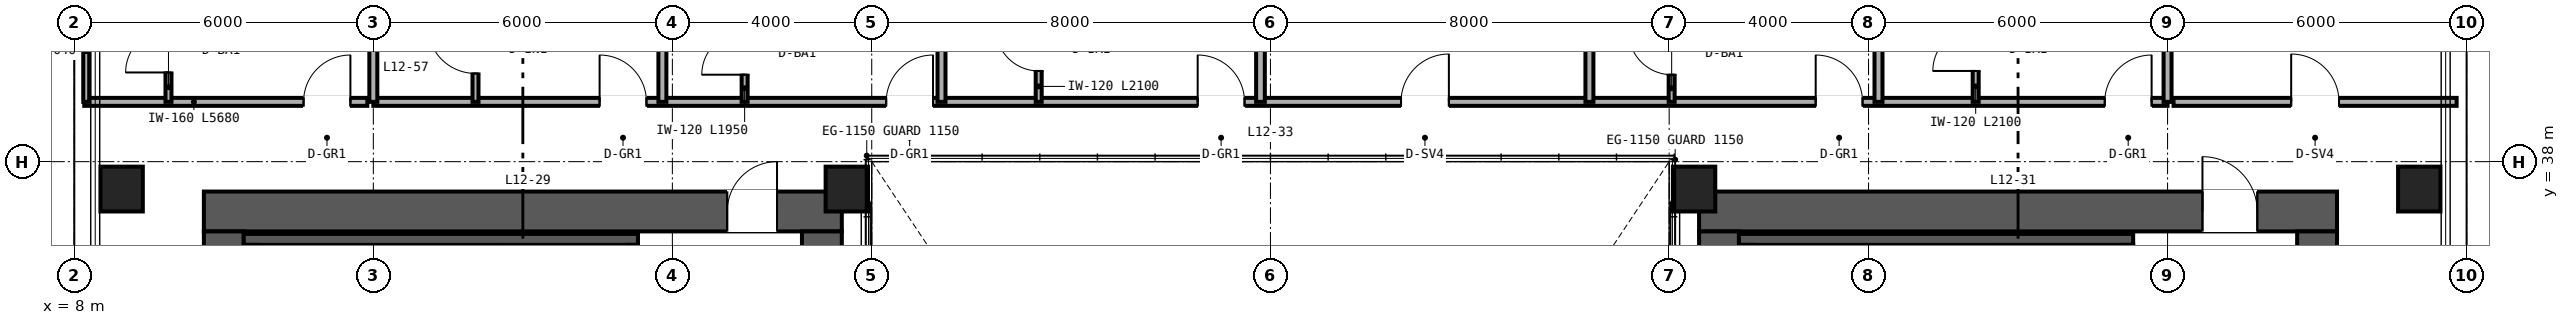
"""IFC4 building model, lengths in metres.
Left out: names, types, materials, properties, quantities, classifications, styles, units other than length and angle.
Written with IfcOpenShell. Run it as: python <this file> out.ifc"""

import sys

from ifc_helpers import new_model, si_unit, direction, frame, frame_2d, origin, origin_2d, place, context, subcontext, project, spatial, rectangle, hollow_rectangle, extrude, source, transform, mapped, element, fill, save


model = new_model("IFC4")
c1 = context("Model", 3, precision=1e-05, world=origin(), true_north=direction((0.0, 1.0)))
c2 = subcontext(c1, "Body", "Model", "MODEL_VIEW")
j1 = project(units=[si_unit("LENGTHUNIT", "METRE"), si_unit("PLANEANGLEUNIT", "RADIAN")], contexts=[c1])
p1 = place(None, origin())
s1 = spatial("IfcSite", under=j1, at=p1, CompositionType="ELEMENT")
p2 = place(p1, origin())
s2 = spatial("IfcBuilding", under=s1, at=p2, CompositionType="ELEMENT")
p3 = place(p2, frame((0.0, 0.0, 52.8)))
s3 = spatial("IfcBuildingStorey", under=s2, at=p3, CompositionType="ELEMENT", Elevation=52.8)
p4 = place(p3, frame((10.6, 37.0, 0.0), z_axis=(0.0, 0.0, 1.0), x_axis=(1.0, 0.0, 0.0)))
e1 = element("IfcWall", 1, at=p4, inside=s3, PredefinedType="SHEAR", context=c2, shape_type="SweptSolid", body=[
    extrude(rectangle(XDim=12.8, YDim=0.8, at=frame_2d((6.4, 0.0))), origin(), (0.0, 0.0, 1.0), 3.35),
])
p5 = place(p4, frame((10.5, 0.0, 0.0)))
e2 = element("IfcOpeningElement", 2, at=p5, cuts=e1, PredefinedType="OPENING", context=c2, shape_type="SweptSolid", body=[
    extrude(rectangle(XDim=1.0, YDim=2.15, at=frame_2d((0.5, 1.075))), frame((0.0, 0.41, 0.0), z_axis=(0.0, -1.0, 0.0), x_axis=(1.0, 0.0, 0.0)), (0.0, 0.0, 1.0), 0.82),
])
for number, where, z_axis, x_axis in (
    (3, (11.0, 15.4, 0.0), (0.0, 0.0, 1.0), (0.0, 1.0, 0.0)),
    (4, (23.0, 15.4, 0.0), (0.0, 0.0, 1.0), (0.0, 1.0, 0.0)),
):
    element("IfcWall", number, at=place(p3, frame(where, z_axis=z_axis, x_axis=x_axis)), inside=s3, PredefinedType="SHEAR", context=c2, shape_type="SweptSolid", body=[
        extrude(rectangle(XDim=21.2, YDim=0.8, at=frame_2d((10.6, 0.0))), origin(), (0.0, 0.0, 1.0), 3.35),
    ])
p6 = place(p3, frame((40.6, 37.0, 0.0), z_axis=(0.0, 0.0, 1.0), x_axis=(1.0, 0.0, 0.0)))
e5 = element("IfcWall", 5, at=p6, inside=s3, PredefinedType="SHEAR", context=c2, shape_type="SweptSolid", body=[
    extrude(rectangle(XDim=12.8, YDim=0.8, at=frame_2d((6.4, 0.0))), origin(), (0.0, 0.0, 1.0), 3.35),
])
p7 = place(p6, frame((10.1, 0.0, 0.0)))
e6 = element("IfcOpeningElement", 6, at=p7, cuts=e5, PredefinedType="OPENING", context=c2, shape_type="SweptSolid", body=[
    extrude(rectangle(XDim=1.1, YDim=2.15, at=frame_2d((0.55, 1.075))), frame((0.0, 0.41, 0.0), z_axis=(0.0, -1.0, 0.0), x_axis=(1.0, 0.0, 0.0)), (0.0, 0.0, 1.0), 0.82),
])
for number, where, z_axis, x_axis in (
    (7, (41.0, 15.4, 0.0), (0.0, 0.0, 1.0), (0.0, 1.0, 0.0)),
    (8, (53.0, 15.4, 0.0), (0.0, 0.0, 1.0), (0.0, 1.0, 0.0)),
):
    element("IfcWall", number, at=place(p3, frame(where, z_axis=z_axis, x_axis=x_axis)), inside=s3, PredefinedType="SHEAR", context=c2, shape_type="SweptSolid", body=[
        extrude(rectangle(XDim=21.2, YDim=0.8, at=frame_2d((10.6, 0.0))), origin(), (0.0, 0.0, 1.0), 3.35),
    ])
p8 = place(p3, frame((11.4, 36.44, 0.0), z_axis=(0.0, 0.0, 1.0), x_axis=(1.0, 0.0, 0.0)))
e9 = element("IfcWall", 9, at=p8, inside=s3, PredefinedType="SHEAR", context=c2, shape_type="SweptSolid", body=[
    extrude(rectangle(XDim=7.91, YDim=0.22, at=frame_2d((3.955, 0.0))), origin(), (0.0, 0.0, 1.0), 3.4),
])
for number, where, z_axis, x_axis in (
    (10, (11.56, 33.05, 0.0), (0.0, 0.0, 1.0), (0.0, 1.0, 0.0)),
    (11, (19.2, 33.05, 0.0), (0.0, 0.0, 1.0), (0.0, 1.0, 0.0)),
):
    element("IfcWall", number, at=place(p3, frame(where, z_axis=z_axis, x_axis=x_axis)), inside=s3, PredefinedType="SHEAR", context=c2, shape_type="SweptSolid", body=[
        extrude(rectangle(XDim=3.28, YDim=0.22, at=frame_2d((1.64, 0.0))), origin(), (0.0, 0.0, 1.0), 3.4),
    ])
p9 = place(p3, frame((41.4, 36.44, 0.0), z_axis=(0.0, 0.0, 1.0), x_axis=(1.0, 0.0, 0.0)))
e12 = element("IfcWall", 12, at=p9, inside=s3, PredefinedType="SHEAR", context=c2, shape_type="SweptSolid", body=[
    extrude(rectangle(XDim=7.91, YDim=0.22, at=frame_2d((3.955, 0.0))), origin(), (0.0, 0.0, 1.0), 3.4),
])
for number, where, z_axis, x_axis in (
    (13, (41.56, 33.05, 0.0), (0.0, 0.0, 1.0), (0.0, 1.0, 0.0)),
    (14, (49.2, 33.05, 0.0), (0.0, 0.0, 1.0), (0.0, 1.0, 0.0)),
):
    element("IfcWall", number, at=place(p3, frame(where, z_axis=z_axis, x_axis=x_axis)), inside=s3, PredefinedType="SHEAR", context=c2, shape_type="SweptSolid", body=[
        extrude(rectangle(XDim=3.28, YDim=0.22, at=frame_2d((1.64, 0.0))), origin(), (0.0, 0.0, 1.0), 3.4),
    ])
m1 = source(origin(), c2, "Body", "SweptSolid", [
    extrude(hollow_rectangle(XDim=0.85, YDim=0.9, WallThickness=0.04, at=origin_2d()), origin(), (0.0, 0.0, 1.0), 3.35),
])
for number, where, z_axis, x_axis in (
    (15, (8.95, 37.45, 0.0), (0.0, 0.0, 1.0), (1.0, 0.0, 0.0)),
    (16, (23.5, 37.45, 0.0), (0.0, 0.0, 1.0), (1.0, 0.0, 0.0)),
    (17, (40.5, 37.45, 0.0), (0.0, 0.0, 1.0), (1.0, 0.0, 0.0)),
    (18, (55.05, 37.45, 0.0), (0.0, 0.0, 1.0), (1.0, 0.0, 0.0)),
):
    element("IfcColumn", number, at=place(p3, frame(where, z_axis=z_axis, x_axis=x_axis)), inside=s3, PredefinedType="COLUMN", context=c2, shape_type="MappedRepresentation", body=[
        mapped(m1, transform((0.0, 0.0, 0.0), scale=1.0)),
    ])
p10 = place(p3, frame((8.2, 39.2, 0.0), z_axis=(0.0, 0.0, 1.0), x_axis=(1.0, 0.0, 0.0)))
e19 = element("IfcWall", 19, at=p10, inside=s3, PredefinedType="PARTITIONING", context=c2, shape_type="SweptSolid", body=[
    extrude(rectangle(XDim=5.68, YDim=0.16, at=frame_2d((2.84, 0.0))), origin(), (0.0, 0.0, 1.0), 3.35),
])
p11 = place(p10, frame((4.4, 0.0, 0.0)))
e20 = element("IfcOpeningElement", 20, at=p11, cuts=e19, PredefinedType="OPENING", context=c2, shape_type="SweptSolid", body=[
    extrude(rectangle(XDim=0.94, YDim=2.15, at=frame_2d((0.47, 1.075))), frame((0.0, 0.09, 0.0), z_axis=(0.0, -1.0, 0.0), x_axis=(1.0, 0.0, 0.0)), (0.0, 0.0, 1.0), 0.18),
])
p12 = place(p3, frame((9.89, 39.2, 0.0), z_axis=(0.0, 0.0, 1.0), x_axis=(0.0, 1.0, 0.0)))
e21 = element("IfcWall", 21, at=p12, inside=s3, PredefinedType="PARTITIONING", context=c2, shape_type="SweptSolid", body=[
    extrude(rectangle(XDim=2.04, YDim=0.12, at=frame_2d((1.02, 0.0))), origin(), (0.0, 0.0, 1.0), 3.35),
])
p13 = place(p12, frame((0.59, 0.0, 0.0)))
e22 = element("IfcOpeningElement", 22, at=p13, cuts=e21, PredefinedType="OPENING", context=c2, shape_type="SweptSolid", body=[
    extrude(rectangle(XDim=0.86, YDim=2.1, at=frame_2d((0.43, 1.05))), frame((0.0, 0.07, 0.0), z_axis=(0.0, -1.0, 0.0), x_axis=(1.0, 0.0, 0.0)), (0.0, 0.0, 1.0), 0.14),
])
p14 = place(p3, frame((8.24, 39.2, 0.0), z_axis=(0.0, 0.0, 1.0), x_axis=(0.0, 1.0, 0.0)))
e23 = element("IfcWall", 23, at=p14, inside=s3, PredefinedType="PARTITIONING", context=c2, shape_type="SweptSolid", body=[
    extrude(rectangle(XDim=2.04, YDim=0.12, at=frame_2d((1.02, 0.0))), origin(), (0.0, 0.0, 1.0), 3.35),
])
p15 = place(p3, frame((50.12, 39.2, 0.0), z_axis=(0.0, 0.0, 1.0), x_axis=(1.0, 0.0, 0.0)))
e24 = element("IfcWall", 24, at=p15, inside=s3, PredefinedType="PARTITIONING", context=c2, shape_type="SweptSolid", body=[
    extrude(rectangle(XDim=5.68, YDim=0.16, at=frame_2d((2.84, 0.0))), origin(), (0.0, 0.0, 1.0), 3.35),
])
p16 = place(p15, frame((2.36, 0.0, 0.0)))
e25 = element("IfcOpeningElement", 25, at=p16, cuts=e24, PredefinedType="OPENING", context=c2, shape_type="SweptSolid", body=[
    extrude(rectangle(XDim=0.96, YDim=2.15, at=frame_2d((0.48, 1.075))), frame((0.0, 0.09, 0.0), z_axis=(0.0, -1.0, 0.0), x_axis=(1.0, 0.0, 0.0)), (0.0, 0.0, 1.0), 0.18),
])
p17 = place(p3, frame((14.0, 39.2, 0.0), z_axis=(0.0, 0.0, 1.0), x_axis=(1.0, 0.0, 0.0)))
e26 = element("IfcWall", 26, at=p17, inside=s3, PredefinedType="PARTITIONING", context=c2, shape_type="SweptSolid", body=[
    extrude(rectangle(XDim=36.0, YDim=0.16, at=frame_2d((18.0, 0.0))), origin(), (0.0, 0.0, 1.0), 2.571),
])
p18 = place(p17, frame((4.54, 0.0, 0.0)))
e27 = element("IfcOpeningElement", 27, at=p18, cuts=e26, PredefinedType="OPENING", context=c2, shape_type="SweptSolid", body=[
    extrude(rectangle(XDim=0.94, YDim=2.15, at=frame_2d((0.47, 1.075))), frame((0.0, 0.09, 0.0), z_axis=(0.0, -1.0, 0.0), x_axis=(1.0, 0.0, 0.0)), (0.0, 0.0, 1.0), 0.18),
])
p19 = place(p17, frame((10.29, 0.0, 0.0)))
e28 = element("IfcOpeningElement", 28, at=p19, cuts=e26, PredefinedType="OPENING", context=c2, shape_type="SweptSolid", body=[
    extrude(rectangle(XDim=0.94, YDim=2.15, at=frame_2d((0.47, 1.075))), frame((0.0, 0.09, 0.0), z_axis=(0.0, -1.0, 0.0), x_axis=(1.0, 0.0, 0.0)), (0.0, 0.0, 1.0), 0.18),
])
p20 = place(p17, frame((16.54, 0.0, 0.0)))
e29 = element("IfcOpeningElement", 29, at=p20, cuts=e26, PredefinedType="OPENING", context=c2, shape_type="SweptSolid", body=[
    extrude(rectangle(XDim=0.94, YDim=2.15, at=frame_2d((0.47, 1.075))), frame((0.0, 0.09, 0.0), z_axis=(0.0, -1.0, 0.0), x_axis=(1.0, 0.0, 0.0)), (0.0, 0.0, 1.0), 0.18),
])
p21 = place(p17, frame((20.62, 0.0, 0.0)))
e30 = element("IfcOpeningElement", 30, at=p21, cuts=e26, PredefinedType="OPENING", context=c2, shape_type="SweptSolid", body=[
    extrude(rectangle(XDim=0.96, YDim=2.15, at=frame_2d((0.48, 1.075))), frame((0.0, 0.09, 0.0), z_axis=(0.0, -1.0, 0.0), x_axis=(1.0, 0.0, 0.0)), (0.0, 0.0, 1.0), 0.18),
])
p22 = place(p17, frame((28.94, 0.0, 0.0)))
e31 = element("IfcOpeningElement", 31, at=p22, cuts=e26, PredefinedType="OPENING", context=c2, shape_type="SweptSolid", body=[
    extrude(rectangle(XDim=0.94, YDim=2.15, at=frame_2d((0.47, 1.075))), frame((0.0, 0.09, 0.0), z_axis=(0.0, -1.0, 0.0), x_axis=(1.0, 0.0, 0.0)), (0.0, 0.0, 1.0), 0.18),
])
p23 = place(p17, frame((34.74, 0.0, 0.0)))
e32 = element("IfcOpeningElement", 32, at=p23, cuts=e26, PredefinedType="OPENING", context=c2, shape_type="SweptSolid", body=[
    extrude(rectangle(XDim=0.94, YDim=2.15, at=frame_2d((0.47, 1.075))), frame((0.0, 0.09, 0.0), z_axis=(0.0, -1.0, 0.0), x_axis=(1.0, 0.0, 0.0)), (0.0, 0.0, 1.0), 0.18),
])
for number, where, z_axis, x_axis in (
    (33, (14.0, 39.2, 0.0), (0.0, 0.0, 1.0), (0.0, 1.0, 0.0)),
    (34, (50.0, 39.2, 0.0), (0.0, 0.0, 1.0), (0.0, 1.0, 0.0)),
    (35, (19.8, 39.2, 0.0), (0.0, 0.0, 1.0), (0.0, 1.0, 0.0)),
):
    element("IfcWall", number, at=place(p3, frame(where, z_axis=z_axis, x_axis=x_axis)), inside=s3, PredefinedType="PARTITIONING", context=c2, shape_type="SweptSolid", body=[
        extrude(rectangle(XDim=10.44, YDim=0.16, at=frame_2d((5.22, 0.0))), origin(), (0.0, 0.0, 1.0), 2.657),
    ])
p24 = place(p3, frame((16.05, 39.2, 0.0), z_axis=(0.0, 0.0, 1.0), x_axis=(0.0, 1.0, 0.0)))
e36 = element("IfcWall", 36, at=p24, inside=s3, PredefinedType="PARTITIONING", context=c2, shape_type="SweptSolid", body=[
    extrude(rectangle(XDim=2.1, YDim=0.12, at=frame_2d((1.05, 0.0))), origin(), (0.0, 0.0, 1.0), 3.35),
])
p25 = place(p24, frame((0.57, 0.0, 0.0)))
e37 = element("IfcOpeningElement", 37, at=p25, cuts=e36, PredefinedType="OPENING", context=c2, shape_type="SweptSolid", body=[
    extrude(rectangle(XDim=0.96, YDim=2.15, at=frame_2d((0.48, 1.075))), frame((0.0, 0.07, 0.0), z_axis=(0.0, -1.0, 0.0), x_axis=(1.0, 0.0, 0.0)), (0.0, 0.0, 1.0), 0.14),
])
p26 = place(p3, frame((25.4, 39.2, 0.0), z_axis=(0.0, 0.0, 1.0), x_axis=(0.0, 1.0, 0.0)))
e38 = element("IfcWall", 38, at=p26, inside=s3, PredefinedType="PARTITIONING", context=c2, shape_type="SweptSolid", body=[
    extrude(rectangle(XDim=10.44, YDim=0.16, at=frame_2d((5.22, 0.0))), origin(), (0.0, 0.0, 1.0), 2.423),
])
p27 = place(p3, frame((21.45, 39.2, 0.0), z_axis=(0.0, 0.0, 1.0), x_axis=(0.0, 1.0, 0.0)))
e39 = element("IfcWall", 39, at=p27, inside=s3, PredefinedType="PARTITIONING", context=c2, shape_type="SweptSolid", body=[
    extrude(rectangle(XDim=1.95, YDim=0.12, at=frame_2d((0.975, 0.0))), origin(), (0.0, 0.0, 1.0), 3.35),
])
p28 = place(p27, frame((0.545, 0.0, 0.0)))
e40 = element("IfcOpeningElement", 40, at=p28, cuts=e39, PredefinedType="OPENING", context=c2, shape_type="SweptSolid", body=[
    extrude(rectangle(XDim=0.86, YDim=2.1, at=frame_2d((0.43, 1.05))), frame((0.0, 0.07, 0.0), z_axis=(0.0, -1.0, 0.0), x_axis=(1.0, 0.0, 0.0)), (0.0, 0.0, 1.0), 0.14),
])
p29 = place(p3, frame((31.8, 39.2, 0.0), z_axis=(0.0, 0.0, 1.0), x_axis=(0.0, 1.0, 0.0)))
e41 = element("IfcWall", 41, at=p29, inside=s3, PredefinedType="PARTITIONING", context=c2, shape_type="SweptSolid", body=[
    extrude(rectangle(XDim=10.44, YDim=0.175, at=frame_2d((5.22, 0.0))), origin(), (0.0, 0.0, 1.0), 2.423),
])
p30 = place(p3, frame((27.35, 39.2, 0.0), z_axis=(0.0, 0.0, 1.0), x_axis=(0.0, 1.0, 0.0)))
e42 = element("IfcWall", 42, at=p30, inside=s3, PredefinedType="PARTITIONING", context=c2, shape_type="SweptSolid", body=[
    extrude(rectangle(XDim=2.1, YDim=0.12, at=frame_2d((1.05, 0.0))), origin(), (0.0, 0.0, 1.0), 3.35),
])
p31 = place(p30, frame((0.62, 0.0, 0.0)))
e43 = element("IfcOpeningElement", 43, at=p31, cuts=e42, PredefinedType="OPENING", context=c2, shape_type="SweptSolid", body=[
    extrude(rectangle(XDim=0.86, YDim=2.1, at=frame_2d((0.43, 1.05))), frame((0.0, 0.07, 0.0), z_axis=(0.0, -1.0, 0.0), x_axis=(1.0, 0.0, 0.0)), (0.0, 0.0, 1.0), 0.14),
])
p32 = place(p3, frame((38.4, 39.2, 0.0), z_axis=(0.0, 0.0, 1.0), x_axis=(0.0, 1.0, 0.0)))
e44 = element("IfcWall", 44, at=p32, inside=s3, PredefinedType="PARTITIONING", context=c2, shape_type="SweptSolid", body=[
    extrude(rectangle(XDim=10.44, YDim=0.16, at=frame_2d((5.22, 0.0))), origin(), (0.0, 0.0, 1.0), 2.423),
])
p33 = place(p3, frame((44.2, 39.2, 0.0), z_axis=(0.0, 0.0, 1.0), x_axis=(0.0, 1.0, 0.0)))
e45 = element("IfcWall", 45, at=p33, inside=s3, PredefinedType="PARTITIONING", context=c2, shape_type="SweptSolid", body=[
    extrude(rectangle(XDim=10.44, YDim=0.16, at=frame_2d((5.22, 0.0))), origin(), (0.0, 0.0, 1.0), 2.657),
])
p34 = place(p3, frame((40.05, 39.2, 0.0), z_axis=(0.0, 0.0, 1.0), x_axis=(0.0, 1.0, 0.0)))
e46 = element("IfcWall", 46, at=p34, inside=s3, PredefinedType="PARTITIONING", context=c2, shape_type="SweptSolid", body=[
    extrude(rectangle(XDim=1.95, YDim=0.12, at=frame_2d((0.975, 0.0))), origin(), (0.0, 0.0, 1.0), 3.35),
])
p35 = place(p34, frame((0.545, 0.0, 0.0)))
e47 = element("IfcOpeningElement", 47, at=p35, cuts=e46, PredefinedType="OPENING", context=c2, shape_type="SweptSolid", body=[
    extrude(rectangle(XDim=0.86, YDim=2.1, at=frame_2d((0.43, 1.05))), frame((0.0, 0.07, 0.0), z_axis=(0.0, -1.0, 0.0), x_axis=(1.0, 0.0, 0.0)), (0.0, 0.0, 1.0), 0.14),
])
p36 = place(p3, frame((46.15, 39.2, 0.0), z_axis=(0.0, 0.0, 1.0), x_axis=(0.0, 1.0, 0.0)))
e48 = element("IfcWall", 48, at=p36, inside=s3, PredefinedType="PARTITIONING", context=c2, shape_type="SweptSolid", body=[
    extrude(rectangle(XDim=2.1, YDim=0.12, at=frame_2d((1.05, 0.0))), origin(), (0.0, 0.0, 1.0), 3.35),
])
p37 = place(p36, frame((0.62, 0.0, 0.0)))
e49 = element("IfcOpeningElement", 49, at=p37, cuts=e48, PredefinedType="OPENING", context=c2, shape_type="SweptSolid", body=[
    extrude(rectangle(XDim=0.86, YDim=2.1, at=frame_2d((0.43, 1.05))), frame((0.0, 0.07, 0.0), z_axis=(0.0, -1.0, 0.0), x_axis=(1.0, 0.0, 0.0)), (0.0, 0.0, 1.0), 0.14),
])
m2 = source(origin(), c2, "Body", "SweptSolid", [
    extrude(rectangle(XDim=1.0, YDim=2.15, at=frame_2d((0.5, 1.075))), frame((0.0, 0.025, 0.0), z_axis=(0.0, -1.0, 0.0), x_axis=(1.0, 0.0, 0.0)), (0.0, 0.0, 1.0), 0.05),
])
p38 = place(p5, origin())
e50 = element("IfcDoor", 50, at=p38, inside=s3, OperationType="SINGLE_SWING_RIGHT", PredefinedType="DOOR", context=c2, shape_type="MappedRepresentation", body=[
    mapped(m2, transform((0.0, 0.0, 0.0), scale=1.0)),
])
fill(e2, e50)
m3 = source(origin(), c2, "Body", "SweptSolid", [
    extrude(rectangle(XDim=1.1, YDim=2.15, at=frame_2d((0.55, 1.075))), frame((0.0, 0.025, 0.0), z_axis=(0.0, -1.0, 0.0), x_axis=(1.0, 0.0, 0.0)), (0.0, 0.0, 1.0), 0.05),
])
p39 = place(p7, origin())
e51 = element("IfcDoor", 51, at=p39, inside=s3, OperationType="SINGLE_SWING_LEFT", PredefinedType="DOOR", context=c2, shape_type="MappedRepresentation", body=[
    mapped(m3, transform((0.0, 0.0, 0.0), scale=1.0)),
])
fill(e6, e51)
m4 = source(origin(), c2, "Body", "SweptSolid", [
    extrude(rectangle(XDim=0.86, YDim=2.1, at=frame_2d((0.43, 1.05))), frame((0.0, 0.025, 0.0), z_axis=(0.0, -1.0, 0.0), x_axis=(1.0, 0.0, 0.0)), (0.0, 0.0, 1.0), 0.05),
])
p40 = place(p13, origin())
e52 = element("IfcDoor", 52, at=p40, inside=s3, OperationType="SINGLE_SWING_LEFT", PredefinedType="DOOR", context=c2, shape_type="MappedRepresentation", body=[
    mapped(m4, transform((0.0, 0.0, 0.0), scale=1.0)),
])
fill(e22, e52)
m5 = source(origin(), c2, "Body", "SweptSolid", [
    extrude(rectangle(XDim=0.94, YDim=2.15, at=frame_2d((0.47, 1.075))), frame((0.0, 0.025, 0.0), z_axis=(0.0, -1.0, 0.0), x_axis=(1.0, 0.0, 0.0)), (0.0, 0.0, 1.0), 0.05),
])
p41 = place(p11, origin())
e53 = element("IfcDoor", 53, at=p41, inside=s3, OperationType="SINGLE_SWING_RIGHT", PredefinedType="DOOR", context=c2, shape_type="MappedRepresentation", body=[
    mapped(m5, transform((0.0, 0.0, 0.0), scale=1.0)),
])
fill(e20, e53)
m6 = source(origin(), c2, "Body", "SweptSolid", [
    extrude(rectangle(XDim=0.96, YDim=2.15, at=frame_2d((0.48, 1.075))), frame((0.0, 0.025, 0.0), z_axis=(0.0, -1.0, 0.0), x_axis=(1.0, 0.0, 0.0)), (0.0, 0.0, 1.0), 0.05),
])
p42 = place(p16, origin())
e54 = element("IfcDoor", 54, at=p42, inside=s3, OperationType="SINGLE_SWING_LEFT", PredefinedType="DOOR", context=c2, shape_type="MappedRepresentation", body=[
    mapped(m6, transform((0.0, 0.0, 0.0), scale=1.0)),
])
fill(e25, e54)
p43 = place(p25, origin())
e55 = element("IfcDoor", 55, at=p43, inside=s3, OperationType="SINGLE_SWING_RIGHT", PredefinedType="DOOR", context=c2, shape_type="MappedRepresentation", body=[
    mapped(m6, transform((0.0, 0.0, 0.0), scale=1.0)),
])
fill(e37, e55)
p44 = place(p28, origin())
e56 = element("IfcDoor", 56, at=p44, inside=s3, OperationType="SINGLE_SWING_LEFT", PredefinedType="DOOR", context=c2, shape_type="MappedRepresentation", body=[
    mapped(m4, transform((0.0, 0.0, 0.0), scale=1.0)),
])
fill(e40, e56)
p45 = place(p31, origin())
e57 = element("IfcDoor", 57, at=p45, inside=s3, OperationType="SINGLE_SWING_RIGHT", PredefinedType="DOOR", context=c2, shape_type="MappedRepresentation", body=[
    mapped(m4, transform((0.0, 0.0, 0.0), scale=1.0)),
])
fill(e43, e57)
p46 = place(p35, origin())
e58 = element("IfcDoor", 58, at=p46, inside=s3, OperationType="SINGLE_SWING_RIGHT", PredefinedType="DOOR", context=c2, shape_type="MappedRepresentation", body=[
    mapped(m4, transform((0.0, 0.0, 0.0), scale=1.0)),
])
fill(e47, e58)
p47 = place(p37, origin())
e59 = element("IfcDoor", 59, at=p47, inside=s3, OperationType="SINGLE_SWING_LEFT", PredefinedType="DOOR", context=c2, shape_type="MappedRepresentation", body=[
    mapped(m4, transform((0.0, 0.0, 0.0), scale=1.0)),
])
fill(e49, e59)
p48 = place(p18, origin())
e60 = element("IfcDoor", 60, at=p48, inside=s3, OperationType="SINGLE_SWING_LEFT", PredefinedType="DOOR", context=c2, shape_type="MappedRepresentation", body=[
    mapped(m5, transform((0.0, 0.0, 0.0), scale=1.0)),
])
fill(e27, e60)
p49 = place(p19, origin())
e61 = element("IfcDoor", 61, at=p49, inside=s3, OperationType="SINGLE_SWING_RIGHT", PredefinedType="DOOR", context=c2, shape_type="MappedRepresentation", body=[
    mapped(m5, transform((0.0, 0.0, 0.0), scale=1.0)),
])
fill(e28, e61)
p50 = place(p20, origin())
e62 = element("IfcDoor", 62, at=p50, inside=s3, OperationType="SINGLE_SWING_LEFT", PredefinedType="DOOR", context=c2, shape_type="MappedRepresentation", body=[
    mapped(m5, transform((0.0, 0.0, 0.0), scale=1.0)),
])
fill(e29, e62)
p51 = place(p21, origin())
e63 = element("IfcDoor", 63, at=p51, inside=s3, OperationType="SINGLE_SWING_RIGHT", PredefinedType="DOOR", context=c2, shape_type="MappedRepresentation", body=[
    mapped(m6, transform((0.0, 0.0, 0.0), scale=1.0)),
])
fill(e30, e63)
p52 = place(p22, origin())
e64 = element("IfcDoor", 64, at=p52, inside=s3, OperationType="SINGLE_SWING_LEFT", PredefinedType="DOOR", context=c2, shape_type="MappedRepresentation", body=[
    mapped(m5, transform((0.0, 0.0, 0.0), scale=1.0)),
])
fill(e31, e64)
p53 = place(p23, origin())
e65 = element("IfcDoor", 65, at=p53, inside=s3, OperationType="SINGLE_SWING_RIGHT", PredefinedType="DOOR", context=c2, shape_type="MappedRepresentation", body=[
    mapped(m5, transform((0.0, 0.0, 0.0), scale=1.0)),
])
fill(e32, e65)
save(model, sys.argv[1])
